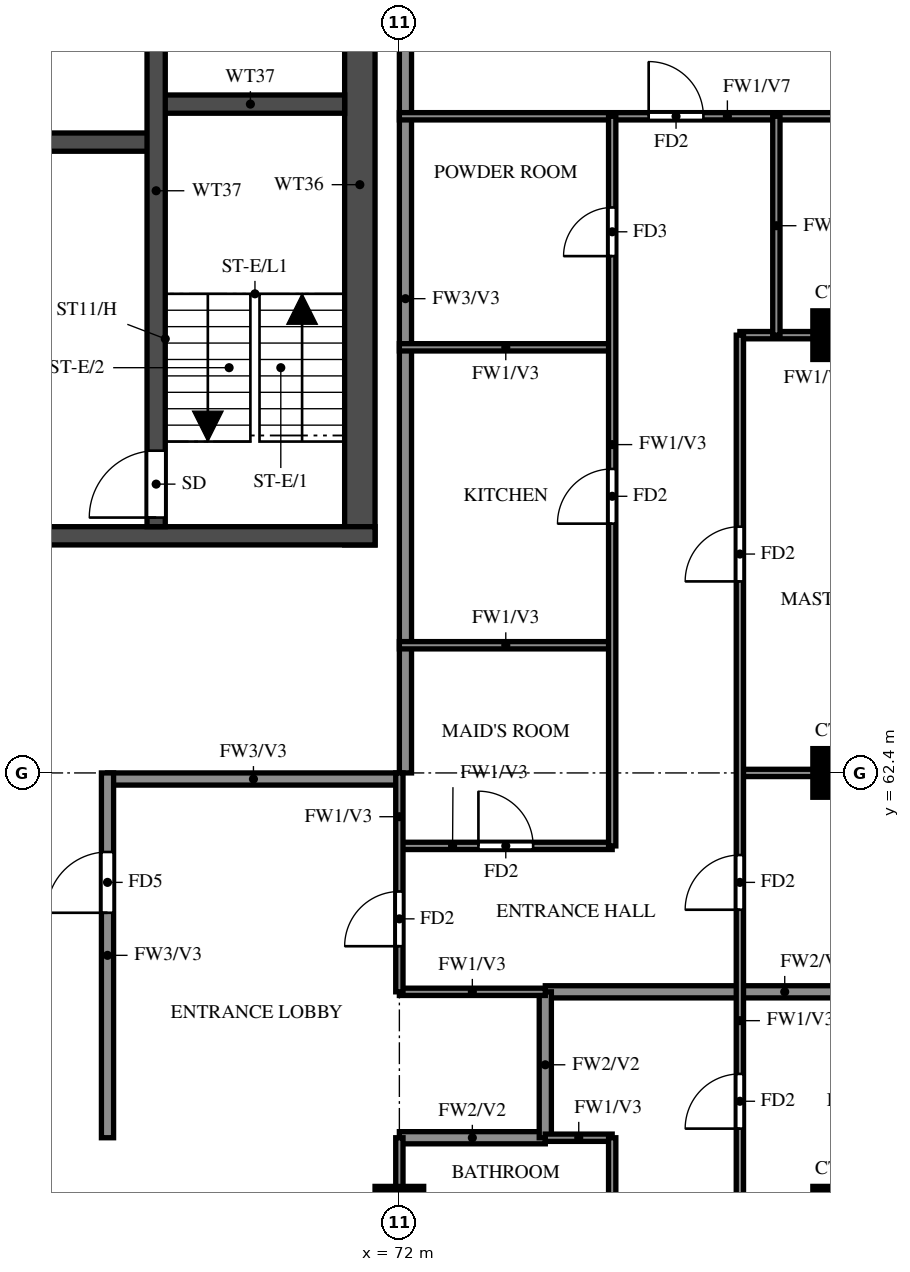
"""IFC4 building model, lengths in metres.
Left out: names, types, materials, properties, quantities, classifications, styles, units other than length and angle.
Written with IfcOpenShell. Run it as: python <this file> out.ifc"""

import sys

from ifc_helpers import new_model, si_unit, direction, frame, frame_2d, origin, origin_2d, place, context, subcontext, project, spatial, rectangle, extrude, source, transform, mapped, element, fill, save


model = new_model("IFC4")
c1 = context("Model", 3, precision=1e-05, world=origin(), true_north=direction((0.0, 1.0)))
c2 = subcontext(c1, "Body", "Model", "MODEL_VIEW")
j1 = project(units=[si_unit("LENGTHUNIT", "METRE"), si_unit("PLANEANGLEUNIT", "RADIAN")], contexts=[c1])
p1 = place(None, origin())
s1 = spatial("IfcSite", under=j1, at=p1, CompositionType="ELEMENT")
p2 = place(p1, origin())
s2 = spatial("IfcBuilding", under=s1, at=p2, CompositionType="ELEMENT")
p3 = place(p2, frame((0.0, 0.0, 246.5)))
s3 = spatial("IfcBuildingStorey", under=s2, at=p3, CompositionType="ELEMENT", Elevation=246.5)
m1 = source(origin(), c2, "Body", "SweptSolid", [
    extrude(rectangle(XDim=0.8, YDim=0.8, at=origin_2d()), origin(), (0.0, 0.0, 1.0), 3.22),
])
for number, where, z_axis, x_axis in (
    (1, (72.0, 55.2, 0.0), (0.0, 0.0, 1.0), (1.0, 0.0, 0.0)),
    (2, (79.2, 55.2, 0.0), (0.0, 0.0, 1.0), (1.0, 0.0, 0.0)),
    (3, (79.2, 62.4, 0.0), (0.0, 0.0, 1.0), (1.0, 0.0, 0.0)),
    (4, (79.2, 69.6, 0.0), (0.0, 0.0, 1.0), (1.0, 0.0, 0.0)),
):
    element("IfcColumn", number, at=place(p3, frame(where, z_axis=z_axis, x_axis=x_axis)), inside=s3, PredefinedType="COLUMN", context=c2, shape_type="MappedRepresentation", body=[
        mapped(m1, transform((0.0, 0.0, 0.0))),
    ])
p4 = place(p3, frame((71.35, 66.15, 0.0), z_axis=(0.0, 0.0, 1.0), x_axis=(0.0, 1.0, 0.0)))
e5 = element("IfcWall", 5, at=p4, inside=s3, PredefinedType="SHEAR", context=c2, shape_type="SweptSolid", body=[
    extrude(rectangle(XDim=11.85, YDim=0.5, at=frame_2d((5.925, 0.0))), origin(), (0.0, 0.0, 1.0), 3.22),
])
p5 = place(p3, frame((29.2, 66.3, 0.0), z_axis=(0.0, 0.0, 1.0), x_axis=(1.0, 0.0, 0.0)))
e6 = element("IfcWall", 6, at=p5, inside=s3, PredefinedType="SHEAR", context=c2, shape_type="SweptSolid", body=[
    extrude(rectangle(XDim=42.4, YDim=0.3, at=frame_2d((21.2, 0.0))), origin(), (0.0, 0.0, 1.0), 3.22),
])
p6 = place(p5, frame((1.425, 0.0, 0.0)))
e7 = element("IfcOpeningElement", 7, at=p6, cuts=e6, PredefinedType="OPENING", context=c2, shape_type="SweptSolid", body=[
    extrude(rectangle(XDim=1.1, YDim=2.1, at=frame_2d((0.55, 1.05))), frame((0.0, 0.16, 0.0), z_axis=(0.0, -1.0, 0.0), x_axis=(1.0, 0.0, 0.0)), (0.0, 0.0, 1.0), 0.32),
])
p7 = place(p5, frame((4.2, 0.0, 0.0)))
e8 = element("IfcOpeningElement", 8, at=p7, cuts=e6, PredefinedType="OPENING", context=c2, shape_type="SweptSolid", body=[
    extrude(rectangle(XDim=1.8, YDim=2.1, at=frame_2d((0.9, 1.05))), frame((0.0, 0.16, 0.0), z_axis=(0.0, -1.0, 0.0), x_axis=(1.0, 0.0, 0.0)), (0.0, 0.0, 1.0), 0.32),
])
p8 = place(p3, frame((32.8, 72.775, 0.0), z_axis=(0.0, 0.0, 1.0), x_axis=(1.0, 0.0, 0.0)))
e9 = element("IfcWall", 9, at=p8, inside=s3, PredefinedType="SHEAR", context=c2, shape_type="SweptSolid", body=[
    extrude(rectangle(XDim=35.2, YDim=0.3, at=frame_2d((17.6, 0.0))), origin(), (0.0, 0.0, 1.0), 3.22),
])
p9 = place(p8, frame((19.8, 0.0, 0.0)))
e10 = element("IfcOpeningElement", 10, at=p9, cuts=e9, PredefinedType="OPENING", context=c2, shape_type="SweptSolid", body=[
    extrude(rectangle(XDim=1.1, YDim=2.1, at=frame_2d((0.55, 1.05))), frame((0.0, 0.16, 0.0), z_axis=(0.0, -1.0, 0.0), x_axis=(1.0, 0.0, 0.0)), (0.0, 0.0, 1.0), 0.32),
])
p10 = place(p8, frame((27.725, 0.0, 0.0)))
e11 = element("IfcOpeningElement", 11, at=p10, cuts=e9, PredefinedType="OPENING", context=c2, shape_type="SweptSolid", body=[
    extrude(rectangle(XDim=1.1, YDim=2.1, at=frame_2d((0.55, 1.05))), frame((0.0, 0.16, 0.0), z_axis=(0.0, -1.0, 0.0), x_axis=(1.0, 0.0, 0.0)), (0.0, 0.0, 1.0), 0.32),
])
p11 = place(p8, frame((30.325, 0.0, 0.0)))
e12 = element("IfcOpeningElement", 12, at=p11, cuts=e9, PredefinedType="OPENING", context=c2, shape_type="SweptSolid", body=[
    extrude(rectangle(XDim=1.1, YDim=2.1, at=frame_2d((0.55, 1.05))), frame((0.0, 0.16, 0.0), z_axis=(0.0, -1.0, 0.0), x_axis=(1.0, 0.0, 0.0)), (0.0, 0.0, 1.0), 0.32),
])
p12 = place(p8, frame((3.825, 0.0, 0.0)))
e13 = element("IfcOpeningElement", 13, at=p12, cuts=e9, PredefinedType="OPENING", context=c2, shape_type="SweptSolid", body=[
    extrude(rectangle(XDim=1.1, YDim=2.1, at=frame_2d((0.55, 1.05))), frame((0.0, 0.16, 0.0), z_axis=(0.0, -1.0, 0.0), x_axis=(1.0, 0.0, 0.0)), (0.0, 0.0, 1.0), 0.32),
])
p13 = place(p8, frame((6.575, 0.0, 0.0)))
e14 = element("IfcOpeningElement", 14, at=p13, cuts=e9, PredefinedType="OPENING", context=c2, shape_type="SweptSolid", body=[
    extrude(rectangle(XDim=1.1, YDim=2.1, at=frame_2d((0.55, 1.05))), frame((0.0, 0.16, 0.0), z_axis=(0.0, -1.0, 0.0), x_axis=(1.0, 0.0, 0.0)), (0.0, 0.0, 1.0), 0.32),
])
p14 = place(p8, frame((9.325, 0.0, 0.0)))
e15 = element("IfcOpeningElement", 15, at=p14, cuts=e9, PredefinedType="OPENING", context=c2, shape_type="SweptSolid", body=[
    extrude(rectangle(XDim=1.1, YDim=2.1, at=frame_2d((0.55, 1.05))), frame((0.0, 0.16, 0.0), z_axis=(0.0, -1.0, 0.0), x_axis=(1.0, 0.0, 0.0)), (0.0, 0.0, 1.0), 0.32),
])
p15 = place(p8, frame((12.075, 0.0, 0.0)))
e16 = element("IfcOpeningElement", 16, at=p15, cuts=e9, PredefinedType="OPENING", context=c2, shape_type="SweptSolid", body=[
    extrude(rectangle(XDim=1.1, YDim=2.1, at=frame_2d((0.55, 1.05))), frame((0.0, 0.16, 0.0), z_axis=(0.0, -1.0, 0.0), x_axis=(1.0, 0.0, 0.0)), (0.0, 0.0, 1.0), 0.32),
])
p16 = place(p8, frame((14.825, 0.0, 0.0)))
e17 = element("IfcOpeningElement", 17, at=p16, cuts=e9, PredefinedType="OPENING", context=c2, shape_type="SweptSolid", body=[
    extrude(rectangle(XDim=1.1, YDim=2.1, at=frame_2d((0.55, 1.05))), frame((0.0, 0.16, 0.0), z_axis=(0.0, -1.0, 0.0), x_axis=(1.0, 0.0, 0.0)), (0.0, 0.0, 1.0), 0.32),
])
p17 = place(p8, frame((17.575, 0.0, 0.0)))
e18 = element("IfcOpeningElement", 18, at=p17, cuts=e9, PredefinedType="OPENING", context=c2, shape_type="SweptSolid", body=[
    extrude(rectangle(XDim=1.1, YDim=2.1, at=frame_2d((0.55, 1.05))), frame((0.0, 0.16, 0.0), z_axis=(0.0, -1.0, 0.0), x_axis=(1.0, 0.0, 0.0)), (0.0, 0.0, 1.0), 0.32),
])
p18 = place(p8, frame((0.95, 0.0, 0.0)))
e19 = element("IfcOpeningElement", 19, at=p18, cuts=e9, PredefinedType="OPENING", context=c2, shape_type="SweptSolid", body=[
    extrude(rectangle(XDim=1.1, YDim=2.1, at=frame_2d((0.55, 1.05))), frame((0.0, 0.16, 0.0), z_axis=(0.0, -1.0, 0.0), x_axis=(1.0, 0.0, 0.0)), (0.0, 0.0, 1.0), 0.32),
])
p19 = place(p3, frame((68.0, 73.4, 0.0), z_axis=(0.0, 0.0, 1.0), x_axis=(1.0, 0.0, 0.0)))
e20 = element("IfcWall", 20, at=p19, inside=s3, PredefinedType="SHEAR", context=c2, shape_type="SweptSolid", body=[
    extrude(rectangle(XDim=3.1, YDim=0.3, at=frame_2d((1.55, 0.0))), origin(), (0.0, 0.0, 1.0), 3.22),
])
p20 = place(p3, frame((68.0, 66.45, 0.0), z_axis=(0.0, 0.0, 1.0), x_axis=(0.0, 1.0, 0.0)))
e21 = element("IfcWall", 21, at=p20, inside=s3, PredefinedType="SHEAR", context=c2, shape_type="SweptSolid", body=[
    extrude(rectangle(XDim=11.05, YDim=0.3, at=frame_2d((5.525, 0.0))), origin(), (0.0, 0.0, 1.0), 3.22),
])
p21 = place(p20, frame((0.15, 0.0, 0.0)))
e22 = element("IfcOpeningElement", 22, at=p21, cuts=e21, PredefinedType="OPENING", context=c2, shape_type="SweptSolid", body=[
    extrude(rectangle(XDim=1.1, YDim=2.1, at=frame_2d((0.55, 1.05))), frame((0.0, 0.16, 0.0), z_axis=(0.0, -1.0, 0.0), x_axis=(1.0, 0.0, 0.0)), (0.0, 0.0, 1.0), 0.32),
])
p22 = place(p3, frame((67.2, 62.3, 0.0), z_axis=(0.0, 0.0, 1.0), x_axis=(1.0, 0.0, 0.0)))
e23 = element("IfcWall", 23, at=p22, inside=s3, PredefinedType="SOLIDWALL", context=c2, shape_type="SweptSolid", body=[
    extrude(rectangle(XDim=4.8, YDim=0.2, at=frame_2d((2.4, 0.0))), origin(), (0.0, 0.0, 1.0), 3.22),
])
p23 = place(p3, frame((67.2, 56.4, 0.0), z_axis=(0.0, 0.0, 1.0), x_axis=(0.0, 1.0, 0.0)))
e24 = element("IfcWall", 24, at=p23, inside=s3, PredefinedType="SOLIDWALL", context=c2, shape_type="SweptSolid", body=[
    extrude(rectangle(XDim=6.0, YDim=0.2, at=frame_2d((3.0, 0.0))), origin(), (0.0, 0.0, 1.0), 3.22),
])
p24 = place(p23, frame((3.7, 0.0, 0.0)))
e25 = element("IfcOpeningElement", 25, at=p24, cuts=e24, PredefinedType="OPENING", context=c2, shape_type="SweptSolid", body=[
    extrude(rectangle(XDim=1.0, YDim=2.1, at=frame_2d((0.5, 1.05))), frame((0.0, 0.11, 0.0), z_axis=(0.0, -1.0, 0.0), x_axis=(1.0, 0.0, 0.0)), (0.0, 0.0, 1.0), 0.22),
])
p25 = place(p3, frame((72.1, 62.4, 0.0), z_axis=(0.0, 0.0, 1.0), x_axis=(0.0, 1.0, 0.0)))
e26 = element("IfcWall", 26, at=p25, inside=s3, PredefinedType="SOLIDWALL", context=c2, shape_type="SweptSolid", body=[
    extrude(rectangle(XDim=15.6, YDim=0.2, at=frame_2d((7.8, 0.0))), origin(), (0.0, 0.0, 1.0), 3.22),
])
p26 = place(p3, frame((72.0, 56.4, 0.0), z_axis=(0.0, 0.0, 1.0), x_axis=(1.0, 0.0, 0.0)))
e27 = element("IfcWall", 27, at=p26, inside=s3, PredefinedType="SOLIDWALL", context=c2, shape_type="SweptSolid", body=[
    extrude(rectangle(XDim=2.4, YDim=0.2, at=frame_2d((1.2, 0.0))), origin(), (0.0, 0.0, 1.0), 3.22),
])
p27 = place(p3, frame((74.4, 58.8, 0.0), z_axis=(0.0, 0.0, 1.0), x_axis=(1.0, 0.0, 0.0)))
e28 = element("IfcWall", 28, at=p27, inside=s3, PredefinedType="SOLIDWALL", context=c2, shape_type="SweptSolid", body=[
    extrude(rectangle(XDim=7.875, YDim=0.2, at=frame_2d((3.938, 0.0))), origin(), (0.0, 0.0, 1.0), 2.32),
])
p28 = place(p3, frame((74.4, 56.4, 0.0), z_axis=(0.0, 0.0, 1.0), x_axis=(0.0, 1.0, 0.0)))
e29 = element("IfcWall", 29, at=p28, inside=s3, PredefinedType="SOLIDWALL", context=c2, shape_type="SweptSolid", body=[
    extrude(rectangle(XDim=2.4, YDim=0.2, at=frame_2d((1.2, 0.0))), origin(), (0.0, 0.0, 1.0), 3.22),
])
p29 = place(p3, frame((74.4, 56.4, 0.0), z_axis=(0.0, 0.0, 1.0), x_axis=(1.0, 0.0, 0.0)))
e30 = element("IfcWall", 30, at=p29, inside=s3, PredefinedType="PARTITIONING", context=c2, shape_type="SweptSolid", body=[
    extrude(rectangle(XDim=1.1, YDim=0.12, at=frame_2d((0.55, 0.0))), origin(), (0.0, 0.0, 1.0), 3.22),
])
p30 = place(p3, frame((72.0, 58.8, 0.0), z_axis=(0.0, 0.0, 1.0), x_axis=(1.0, 0.0, 0.0)))
e31 = element("IfcWall", 31, at=p30, inside=s3, PredefinedType="PARTITIONING", context=c2, shape_type="SweptSolid", body=[
    extrude(rectangle(XDim=2.4, YDim=0.12, at=frame_2d((1.2, 0.0))), origin(), (0.0, 0.0, 1.0), 3.22),
])
p31 = place(p3, frame((72.0, 61.2, 0.0), z_axis=(0.0, 0.0, 1.0), x_axis=(1.0, 0.0, 0.0)))
e32 = element("IfcWall", 32, at=p31, inside=s3, PredefinedType="PARTITIONING", context=c2, shape_type="SweptSolid", body=[
    extrude(rectangle(XDim=3.5, YDim=0.12, at=frame_2d((1.75, 0.0))), origin(), (0.0, 0.0, 1.0), 3.22),
])
p32 = place(p31, frame((1.3, 0.0, 0.0)))
e33 = element("IfcOpeningElement", 33, at=p32, cuts=e32, PredefinedType="OPENING", context=c2, shape_type="SweptSolid", body=[
    extrude(rectangle(XDim=0.9, YDim=2.1, at=frame_2d((0.45, 1.05))), frame((0.0, 0.07, 0.0), z_axis=(0.0, -1.0, 0.0), x_axis=(1.0, 0.0, 0.0)), (0.0, 0.0, 1.0), 0.14),
])
p33 = place(p3, frame((77.6, 62.4, 0.0), z_axis=(0.0, 0.0, 1.0), x_axis=(1.0, 0.0, 0.0)))
e34 = element("IfcWall", 34, at=p33, inside=s3, PredefinedType="PARTITIONING", context=c2, shape_type="SweptSolid", body=[
    extrude(rectangle(XDim=4.675, YDim=0.12, at=frame_2d((2.337, 0.0))), origin(), (0.0, 0.0, 1.0), 3.22),
])
for number, where, z_axis, x_axis in (
    (35, (72.0, 64.5, 0.0), (0.0, 0.0, 1.0), (1.0, 0.0, 0.0)),
    (36, (72.0, 69.4, 0.0), (0.0, 0.0, 1.0), (1.0, 0.0, 0.0)),
):
    element("IfcWall", number, at=place(p3, frame(where, z_axis=z_axis, x_axis=x_axis)), inside=s3, PredefinedType="PARTITIONING", context=c2, shape_type="SweptSolid", body=[
        extrude(rectangle(XDim=3.5, YDim=0.12, at=frame_2d((1.75, 0.0))), origin(), (0.0, 0.0, 1.0), 3.22),
    ])
p34 = place(p3, frame((77.6, 69.6, 0.0), z_axis=(0.0, 0.0, 1.0), x_axis=(1.0, 0.0, 0.0)))
e37 = element("IfcWall", 37, at=p34, inside=s3, PredefinedType="PARTITIONING", context=c2, shape_type="SweptSolid", body=[
    extrude(rectangle(XDim=4.675, YDim=0.12, at=frame_2d((2.337, 0.0))), origin(), (0.0, 0.0, 1.0), 3.22),
])
p35 = place(p34, frame((2.337, 0.0, 0.0)))
e38 = element("IfcOpeningElement", 38, at=p35, cuts=e37, PredefinedType="OPENING", context=c2, shape_type="SweptSolid", body=[
    extrude(rectangle(XDim=0.8, YDim=2.1, at=frame_2d((0.4, 1.05))), frame((0.0, 0.07, 0.0), z_axis=(0.0, -1.0, 0.0), x_axis=(1.0, 0.0, 0.0)), (0.0, 0.0, 1.0), 0.14),
])
p36 = place(p3, frame((72.0, 73.2, 0.0), z_axis=(0.0, 0.0, 1.0), x_axis=(1.0, 0.0, 0.0)))
e39 = element("IfcWall", 39, at=p36, inside=s3, PredefinedType="PARTITIONING", context=c2, shape_type="SweptSolid", body=[
    extrude(rectangle(XDim=10.275, YDim=0.12, at=frame_2d((5.137, 0.0))), origin(), (0.0, 0.0, 1.0), 2.32),
])
p37 = place(p36, frame((4.1, 0.0, 0.0)))
e40 = element("IfcOpeningElement", 40, at=p37, cuts=e39, PredefinedType="OPENING", context=c2, shape_type="SweptSolid", body=[
    extrude(rectangle(XDim=0.9, YDim=2.1, at=frame_2d((0.45, 1.05))), frame((0.0, 0.07, 0.0), z_axis=(0.0, -1.0, 0.0), x_axis=(1.0, 0.0, 0.0)), (0.0, 0.0, 1.0), 0.14),
])
p38 = place(p3, frame((72.0, 54.0, 0.0), z_axis=(0.0, 0.0, 1.0), x_axis=(0.0, 1.0, 0.0)))
e41 = element("IfcWall", 41, at=p38, inside=s3, PredefinedType="PARTITIONING", context=c2, shape_type="SweptSolid", body=[
    extrude(rectangle(XDim=2.4, YDim=0.12, at=frame_2d((1.2, 0.0))), origin(), (0.0, 0.0, 1.0), 3.22),
])
p39 = place(p3, frame((72.0, 58.8, 0.0), z_axis=(0.0, 0.0, 1.0), x_axis=(0.0, 1.0, 0.0)))
e42 = element("IfcWall", 42, at=p39, inside=s3, PredefinedType="PARTITIONING", context=c2, shape_type="SweptSolid", body=[
    extrude(rectangle(XDim=3.6, YDim=0.12, at=frame_2d((1.8, 0.0))), origin(), (0.0, 0.0, 1.0), 3.22),
])
p40 = place(p39, frame((0.75, 0.0, 0.0)))
e43 = element("IfcOpeningElement", 43, at=p40, cuts=e42, PredefinedType="OPENING", context=c2, shape_type="SweptSolid", body=[
    extrude(rectangle(XDim=0.9, YDim=2.1, at=frame_2d((0.45, 1.05))), frame((0.0, 0.07, 0.0), z_axis=(0.0, -1.0, 0.0), x_axis=(1.0, 0.0, 0.0)), (0.0, 0.0, 1.0), 0.14),
])
p41 = place(p3, frame((75.5, 54.0, 0.0), z_axis=(0.0, 0.0, 1.0), x_axis=(0.0, 1.0, 0.0)))
e44 = element("IfcWall", 44, at=p41, inside=s3, PredefinedType="PARTITIONING", context=c2, shape_type="SweptSolid", body=[
    extrude(rectangle(XDim=2.4, YDim=0.12, at=frame_2d((1.2, 0.0))), origin(), (0.0, 0.0, 1.0), 3.22),
])
p42 = place(p3, frame((75.5, 61.2, 0.0), z_axis=(0.0, 0.0, 1.0), x_axis=(0.0, 1.0, 0.0)))
e45 = element("IfcWall", 45, at=p42, inside=s3, PredefinedType="PARTITIONING", context=c2, shape_type="SweptSolid", body=[
    extrude(rectangle(XDim=12.0, YDim=0.12, at=frame_2d((6.0, 0.0))), origin(), (0.0, 0.0, 1.0), 3.22),
])
p43 = place(p42, frame((5.3, 0.0, 0.0)))
e46 = element("IfcOpeningElement", 46, at=p43, cuts=e45, PredefinedType="OPENING", context=c2, shape_type="SweptSolid", body=[
    extrude(rectangle(XDim=0.9, YDim=2.1, at=frame_2d((0.45, 1.05))), frame((0.0, 0.07, 0.0), z_axis=(0.0, -1.0, 0.0), x_axis=(1.0, 0.0, 0.0)), (0.0, 0.0, 1.0), 0.14),
])
p44 = place(p42, frame((9.7, 0.0, 0.0)))
e47 = element("IfcOpeningElement", 47, at=p44, cuts=e45, PredefinedType="OPENING", context=c2, shape_type="SweptSolid", body=[
    extrude(rectangle(XDim=0.8, YDim=2.1, at=frame_2d((0.4, 1.05))), frame((0.0, 0.07, 0.0), z_axis=(0.0, -1.0, 0.0), x_axis=(1.0, 0.0, 0.0)), (0.0, 0.0, 1.0), 0.14),
])
p45 = place(p3, frame((77.6, 48.125, 0.0), z_axis=(0.0, 0.0, 1.0), x_axis=(0.0, 1.0, 0.0)))
e48 = element("IfcWall", 48, at=p45, inside=s3, PredefinedType="PARTITIONING", context=c2, shape_type="SweptSolid", body=[
    extrude(rectangle(XDim=21.475, YDim=0.12, at=frame_2d((10.738, 0.0))), origin(), (0.0, 0.0, 1.0), 3.22),
])
p46 = place(p45, frame((2.788, 0.0, 0.0)))
e49 = element("IfcOpeningElement", 49, at=p46, cuts=e48, PredefinedType="OPENING", context=c2, shape_type="SweptSolid", body=[
    extrude(rectangle(XDim=1.5, YDim=2.1, at=frame_2d((0.75, 1.05))), frame((0.0, 0.07, 0.0), z_axis=(0.0, -1.0, 0.0), x_axis=(1.0, 0.0, 0.0)), (0.0, 0.0, 1.0), 0.14),
])
p47 = place(p45, frame((8.425, 0.0, 0.0)))
e50 = element("IfcOpeningElement", 50, at=p47, cuts=e48, PredefinedType="OPENING", context=c2, shape_type="SweptSolid", body=[
    extrude(rectangle(XDim=0.9, YDim=2.1, at=frame_2d((0.45, 1.05))), frame((0.0, 0.07, 0.0), z_axis=(0.0, -1.0, 0.0), x_axis=(1.0, 0.0, 0.0)), (0.0, 0.0, 1.0), 0.14),
])
p48 = place(p45, frame((12.025, 0.0, 0.0)))
e51 = element("IfcOpeningElement", 51, at=p48, cuts=e48, PredefinedType="OPENING", context=c2, shape_type="SweptSolid", body=[
    extrude(rectangle(XDim=0.9, YDim=2.1, at=frame_2d((0.45, 1.05))), frame((0.0, 0.07, 0.0), z_axis=(0.0, -1.0, 0.0), x_axis=(1.0, 0.0, 0.0)), (0.0, 0.0, 1.0), 0.14),
])
p49 = place(p45, frame((17.425, 0.0, 0.0)))
e52 = element("IfcOpeningElement", 52, at=p49, cuts=e48, PredefinedType="OPENING", context=c2, shape_type="SweptSolid", body=[
    extrude(rectangle(XDim=0.9, YDim=2.1, at=frame_2d((0.45, 1.05))), frame((0.0, 0.07, 0.0), z_axis=(0.0, -1.0, 0.0), x_axis=(1.0, 0.0, 0.0)), (0.0, 0.0, 1.0), 0.14),
])
p50 = place(p3, frame((78.2, 69.6, 0.0), z_axis=(0.0, 0.0, 1.0), x_axis=(0.0, 1.0, 0.0)))
e53 = element("IfcWall", 53, at=p50, inside=s3, PredefinedType="PARTITIONING", context=c2, shape_type="SweptSolid", body=[
    extrude(rectangle(XDim=3.6, YDim=0.12, at=frame_2d((1.8, 0.0))), origin(), (0.0, 0.0, 1.0), 3.22),
])
p51 = place(p21, origin())
e54 = element("IfcDoor", 54, at=p51, inside=s3, OperationType="SINGLE_SWING_RIGHT", PredefinedType="DOOR", context=c2, shape_type="SweptSolid", body=[
    extrude(rectangle(XDim=1.1, YDim=2.1, at=frame_2d((0.55, 1.05))), frame((0.0, 0.025, 0.0), z_axis=(0.0, -1.0, 0.0), x_axis=(1.0, 0.0, 0.0)), (0.0, 0.0, 1.0), 0.05),
])
fill(e22, e54)
p52 = place(p47, origin())
e55 = element("IfcDoor", 55, at=p52, inside=s3, OperationType="SINGLE_SWING_RIGHT", PredefinedType="DOOR", context=c2, shape_type="SweptSolid", body=[
    extrude(rectangle(XDim=0.9, YDim=2.1, at=frame_2d((0.45, 1.05))), frame((0.0, 0.025, 0.0), z_axis=(0.0, -1.0, 0.0), x_axis=(1.0, 0.0, 0.0)), (0.0, 0.0, 1.0), 0.05),
])
fill(e50, e55)
p53 = place(p40, origin())
e56 = element("IfcDoor", 56, at=p53, inside=s3, OperationType="SINGLE_SWING_RIGHT", PredefinedType="DOOR", context=c2, shape_type="SweptSolid", body=[
    extrude(rectangle(XDim=0.9, YDim=2.1, at=frame_2d((0.45, 1.05))), frame((0.0, 0.025, 0.0), z_axis=(0.0, -1.0, 0.0), x_axis=(1.0, 0.0, 0.0)), (0.0, 0.0, 1.0), 0.05),
])
fill(e43, e56)
p54 = place(p24, origin())
e57 = element("IfcDoor", 57, at=p54, inside=s3, OperationType="SINGLE_SWING_LEFT", PredefinedType="DOOR", context=c2, shape_type="SweptSolid", body=[
    extrude(rectangle(XDim=1.0, YDim=2.1, at=frame_2d((0.5, 1.05))), frame((0.0, 0.025, 0.0), z_axis=(0.0, -1.0, 0.0), x_axis=(1.0, 0.0, 0.0)), (0.0, 0.0, 1.0), 0.05),
])
fill(e25, e57)
p55 = place(p48, origin())
e58 = element("IfcDoor", 58, at=p55, inside=s3, OperationType="SINGLE_SWING_LEFT", PredefinedType="DOOR", context=c2, shape_type="SweptSolid", body=[
    extrude(rectangle(XDim=0.9, YDim=2.1, at=frame_2d((0.45, 1.05))), frame((0.0, 0.025, 0.0), z_axis=(0.0, -1.0, 0.0), x_axis=(1.0, 0.0, 0.0)), (0.0, 0.0, 1.0), 0.05),
])
fill(e51, e58)
p56 = place(p49, origin())
e59 = element("IfcDoor", 59, at=p56, inside=s3, OperationType="SINGLE_SWING_RIGHT", PredefinedType="DOOR", context=c2, shape_type="SweptSolid", body=[
    extrude(rectangle(XDim=0.9, YDim=2.1, at=frame_2d((0.45, 1.05))), frame((0.0, 0.025, 0.0), z_axis=(0.0, -1.0, 0.0), x_axis=(1.0, 0.0, 0.0)), (0.0, 0.0, 1.0), 0.05),
])
fill(e52, e59)
p57 = place(p37, origin())
e60 = element("IfcDoor", 60, at=p57, inside=s3, OperationType="SINGLE_SWING_LEFT", PredefinedType="DOOR", context=c2, shape_type="SweptSolid", body=[
    extrude(rectangle(XDim=0.9, YDim=2.1, at=frame_2d((0.45, 1.05))), frame((0.0, 0.025, 0.0), z_axis=(0.0, -1.0, 0.0), x_axis=(1.0, 0.0, 0.0)), (0.0, 0.0, 1.0), 0.05),
])
fill(e40, e60)
p58 = place(p32, origin())
e61 = element("IfcDoor", 61, at=p58, inside=s3, OperationType="SINGLE_SWING_RIGHT", PredefinedType="DOOR", context=c2, shape_type="SweptSolid", body=[
    extrude(rectangle(XDim=0.9, YDim=2.1, at=frame_2d((0.45, 1.05))), frame((0.0, 0.025, 0.0), z_axis=(0.0, -1.0, 0.0), x_axis=(1.0, 0.0, 0.0)), (0.0, 0.0, 1.0), 0.05),
])
fill(e33, e61)
p59 = place(p43, origin())
e62 = element("IfcDoor", 62, at=p59, inside=s3, OperationType="SINGLE_SWING_LEFT", PredefinedType="DOOR", context=c2, shape_type="SweptSolid", body=[
    extrude(rectangle(XDim=0.9, YDim=2.1, at=frame_2d((0.45, 1.05))), frame((0.0, 0.025, 0.0), z_axis=(0.0, -1.0, 0.0), x_axis=(1.0, 0.0, 0.0)), (0.0, 0.0, 1.0), 0.05),
])
fill(e46, e62)
p60 = place(p44, origin())
e63 = element("IfcDoor", 63, at=p60, inside=s3, OperationType="SINGLE_SWING_LEFT", PredefinedType="DOOR", context=c2, shape_type="SweptSolid", body=[
    extrude(rectangle(XDim=0.8, YDim=2.1, at=frame_2d((0.4, 1.05))), frame((0.0, 0.025, 0.0), z_axis=(0.0, -1.0, 0.0), x_axis=(1.0, 0.0, 0.0)), (0.0, 0.0, 1.0), 0.05),
])
fill(e47, e63)
save(model, sys.argv[1])
